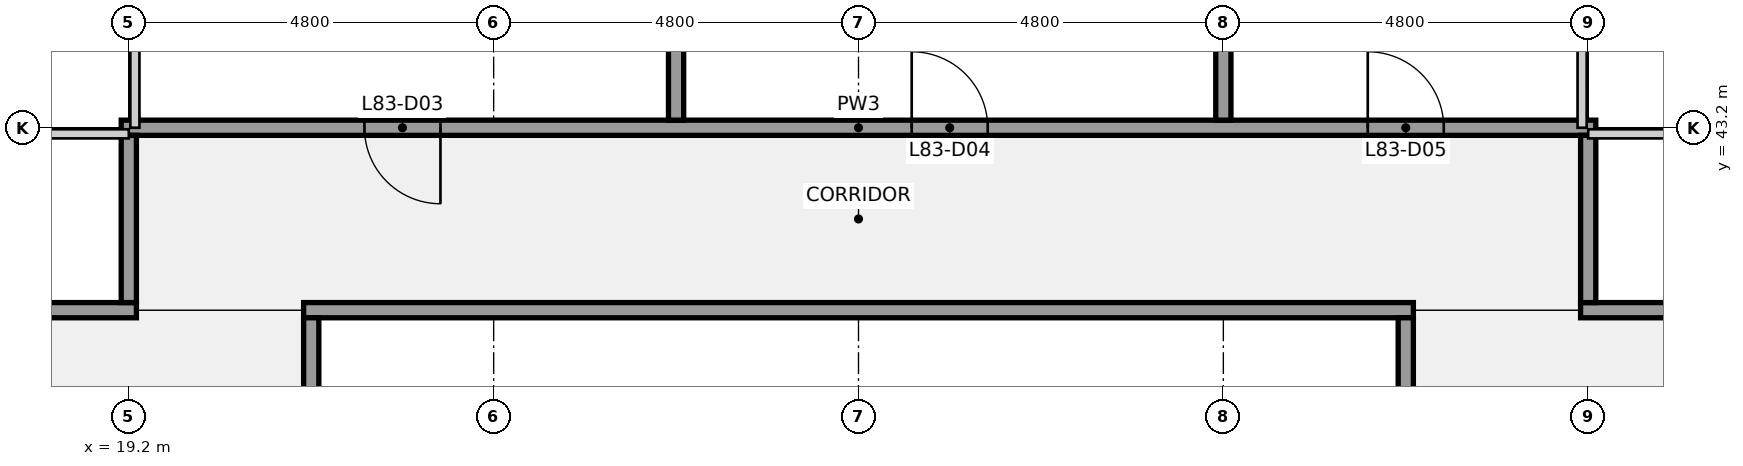
"""IFC4 building model, lengths in metres.
Left out: names, types, materials, properties, quantities, classifications, styles, units other than length and angle.
Written with IfcOpenShell. Run it as: python <this file> out.ifc"""

import sys

from ifc_helpers import new_model, si_unit, direction, frame, frame_2d, origin, place, context, subcontext, project, spatial, rectangle, extrude, element, fill, save


model = new_model("IFC4")
c1 = context("Model", 3, precision=1e-05, world=origin(), true_north=direction((0.0, 1.0)))
c2 = subcontext(c1, "Body", "Model", "MODEL_VIEW")
j1 = project(units=[si_unit("LENGTHUNIT", "METRE"), si_unit("PLANEANGLEUNIT", "RADIAN")], contexts=[c1])
p1 = place(None, origin())
s1 = spatial("IfcSite", under=j1, at=p1, CompositionType="ELEMENT")
p2 = place(p1, origin())
s2 = spatial("IfcBuilding", under=s1, at=p2, CompositionType="ELEMENT")
p3 = place(p2, frame((0.0, 0.0, 370.3)))
s3 = spatial("IfcBuildingStorey", under=s2, at=p3, CompositionType="ELEMENT", Elevation=370.3)
p4 = place(p3, frame((14.5, 40.8, 0.0), z_axis=(0.0, 0.0, 1.0), x_axis=(1.0, 0.0, 0.0)))
e1 = element("IfcWall", 1, at=p4, inside=s3, PredefinedType="PARTITIONING", context=c2, shape_type="SweptSolid", body=[
    extrude(rectangle(XDim=4.8, YDim=0.2, at=frame_2d((2.4, 0.0))), origin(), (0.0, 0.0, 1.0), 2.759),
])
p5 = place(p4, frame((1.85, 0.0, 0.0)))
e2 = element("IfcOpeningElement", 2, at=p5, cuts=e1, PredefinedType="OPENING", context=c2, shape_type="SweptSolid", body=[
    extrude(rectangle(XDim=1.0, YDim=2.1, at=frame_2d((0.5, 1.05))), frame((0.0, 0.11, 0.0), z_axis=(0.0, -1.0, 0.0), x_axis=(1.0, 0.0, 0.0)), (0.0, 0.0, 1.0), 0.22),
])
p6 = place(p3, frame((21.5, 40.8, 0.0), z_axis=(0.0, 0.0, 1.0), x_axis=(1.0, 0.0, 0.0)))
e3 = element("IfcWall", 3, at=p6, inside=s3, PredefinedType="PARTITIONING", context=c2, shape_type="SweptSolid", body=[
    extrude(rectangle(XDim=14.6, YDim=0.2, at=frame_2d((7.3, 0.0))), origin(), (0.0, 0.0, 1.0), 2.759),
])
p7 = place(p3, frame((38.3, 40.8, 0.0), z_axis=(0.0, 0.0, 1.0), x_axis=(1.0, 0.0, 0.0)))
e4 = element("IfcWall", 4, at=p7, inside=s3, PredefinedType="PARTITIONING", context=c2, shape_type="SweptSolid", body=[
    extrude(rectangle(XDim=4.8, YDim=0.2, at=frame_2d((2.4, 0.0))), origin(), (0.0, 0.0, 1.0), 2.759),
])
p8 = place(p7, frame((1.95, 0.0, 0.0)))
e5 = element("IfcOpeningElement", 5, at=p8, cuts=e4, PredefinedType="OPENING", context=c2, shape_type="SweptSolid", body=[
    extrude(rectangle(XDim=1.0, YDim=2.1, at=frame_2d((0.5, 1.05))), frame((0.0, 0.11, 0.0), z_axis=(0.0, -1.0, 0.0), x_axis=(1.0, 0.0, 0.0)), (0.0, 0.0, 1.0), 0.22),
])
p9 = place(p3, frame((19.1, 43.2, 0.0), z_axis=(0.0, 0.0, 1.0), x_axis=(1.0, 0.0, 0.0)))
e6 = element("IfcWall", 6, at=p9, inside=s3, PredefinedType="PARTITIONING", context=c2, shape_type="SweptSolid", body=[
    extrude(rectangle(XDim=19.4, YDim=0.2, at=frame_2d((9.7, 0.0))), origin(), (0.0, 0.0, 1.0), 2.759),
])
p10 = place(p9, frame((3.2, 0.0, 0.0)))
e7 = element("IfcOpeningElement", 7, at=p10, cuts=e6, PredefinedType="OPENING", context=c2, shape_type="SweptSolid", body=[
    extrude(rectangle(XDim=1.0, YDim=2.1, at=frame_2d((0.5, 1.05))), frame((0.0, 0.11, 0.0), z_axis=(0.0, -1.0, 0.0), x_axis=(1.0, 0.0, 0.0)), (0.0, 0.0, 1.0), 0.22),
])
p11 = place(p9, frame((10.4, 0.0, 0.0)))
e8 = element("IfcOpeningElement", 8, at=p11, cuts=e6, PredefinedType="OPENING", context=c2, shape_type="SweptSolid", body=[
    extrude(rectangle(XDim=1.0, YDim=2.1, at=frame_2d((0.5, 1.05))), frame((0.0, 0.11, 0.0), z_axis=(0.0, -1.0, 0.0), x_axis=(1.0, 0.0, 0.0)), (0.0, 0.0, 1.0), 0.22),
])
p12 = place(p9, frame((16.4, 0.0, 0.0)))
e9 = element("IfcOpeningElement", 9, at=p12, cuts=e6, PredefinedType="OPENING", context=c2, shape_type="SweptSolid", body=[
    extrude(rectangle(XDim=1.0, YDim=2.1, at=frame_2d((0.5, 1.05))), frame((0.0, 0.11, 0.0), z_axis=(0.0, -1.0, 0.0), x_axis=(1.0, 0.0, 0.0)), (0.0, 0.0, 1.0), 0.22),
])
p13 = place(p3, frame((19.2, 40.9, 0.0), z_axis=(0.0, 0.0, 1.0), x_axis=(0.0, 1.0, 0.0)))
e10 = element("IfcWall", 10, at=p13, inside=s3, PredefinedType="PARTITIONING", context=c2, shape_type="SweptSolid", body=[
    extrude(rectangle(XDim=2.2, YDim=0.2, at=frame_2d((1.1, 0.0))), origin(), (0.0, 0.0, 1.0), 2.759),
])
p14 = place(p3, frame((21.6, 26.5, 0.0), z_axis=(0.0, 0.0, 1.0), x_axis=(0.0, 1.0, 0.0)))
e11 = element("IfcWall", 11, at=p14, inside=s3, PredefinedType="PARTITIONING", context=c2, shape_type="SweptSolid", body=[
    extrude(rectangle(XDim=14.2, YDim=0.2, at=frame_2d((7.1, 0.0))), origin(), (0.0, 0.0, 1.0), 2.759),
])
p15 = place(p14, frame((6.6, 0.0, 0.0)))
e12 = element("IfcOpeningElement", 12, at=p15, cuts=e11, PredefinedType="OPENING", context=c2, shape_type="SweptSolid", body=[
    extrude(rectangle(XDim=1.0, YDim=2.1, at=frame_2d((0.5, 1.05))), frame((0.0, 0.11, 0.0), z_axis=(0.0, -1.0, 0.0), x_axis=(1.0, 0.0, 0.0)), (0.0, 0.0, 1.0), 0.22),
])
for number, where, z_axis, x_axis in (
    (13, (26.4, 43.3, 0.0), (0.0, 0.0, 1.0), (0.0, 1.0, 0.0)),
    (14, (33.6, 43.3, 0.0), (0.0, 0.0, 1.0), (0.0, 1.0, 0.0)),
):
    element("IfcWall", number, at=place(p3, frame(where, z_axis=z_axis, x_axis=x_axis)), inside=s3, PredefinedType="PARTITIONING", context=c2, shape_type="SweptSolid", body=[
        extrude(rectangle(XDim=4.6, YDim=0.2, at=frame_2d((2.3, 0.0))), origin(), (0.0, 0.0, 1.0), 2.759),
    ])
p16 = place(p3, frame((36.0, 26.5, 0.0), z_axis=(0.0, 0.0, 1.0), x_axis=(0.0, 1.0, 0.0)))
e15 = element("IfcWall", 15, at=p16, inside=s3, PredefinedType="PARTITIONING", context=c2, shape_type="SweptSolid", body=[
    extrude(rectangle(XDim=14.2, YDim=0.2, at=frame_2d((7.1, 0.0))), origin(), (0.0, 0.0, 1.0), 2.759),
])
p17 = place(p3, frame((38.4, 40.9, 0.0), z_axis=(0.0, 0.0, 1.0), x_axis=(0.0, 1.0, 0.0)))
e16 = element("IfcWall", 16, at=p17, inside=s3, PredefinedType="PARTITIONING", context=c2, shape_type="SweptSolid", body=[
    extrude(rectangle(XDim=2.2, YDim=0.2, at=frame_2d((1.1, 0.0))), origin(), (0.0, 0.0, 1.0), 2.759),
])
p18 = place(p10, origin())
e17 = element("IfcDoor", 17, at=p18, inside=s3, OperationType="SINGLE_SWING_RIGHT", PredefinedType="DOOR", context=c2, shape_type="SweptSolid", body=[
    extrude(rectangle(XDim=1.0, YDim=2.1, at=frame_2d((0.5, 1.05))), frame((0.0, 0.025, 0.0), z_axis=(0.0, -1.0, 0.0), x_axis=(1.0, 0.0, 0.0)), (0.0, 0.0, 1.0), 0.05),
])
fill(e7, e17)
p19 = place(p11, origin())
e18 = element("IfcDoor", 18, at=p19, inside=s3, OperationType="SINGLE_SWING_LEFT", PredefinedType="DOOR", context=c2, shape_type="SweptSolid", body=[
    extrude(rectangle(XDim=1.0, YDim=2.1, at=frame_2d((0.5, 1.05))), frame((0.0, 0.025, 0.0), z_axis=(0.0, -1.0, 0.0), x_axis=(1.0, 0.0, 0.0)), (0.0, 0.0, 1.0), 0.05),
])
fill(e8, e18)
p20 = place(p12, origin())
e19 = element("IfcDoor", 19, at=p20, inside=s3, OperationType="SINGLE_SWING_LEFT", PredefinedType="DOOR", context=c2, shape_type="SweptSolid", body=[
    extrude(rectangle(XDim=1.0, YDim=2.1, at=frame_2d((0.5, 1.05))), frame((0.0, 0.025, 0.0), z_axis=(0.0, -1.0, 0.0), x_axis=(1.0, 0.0, 0.0)), (0.0, 0.0, 1.0), 0.05),
])
fill(e9, e19)
save(model, sys.argv[1])
